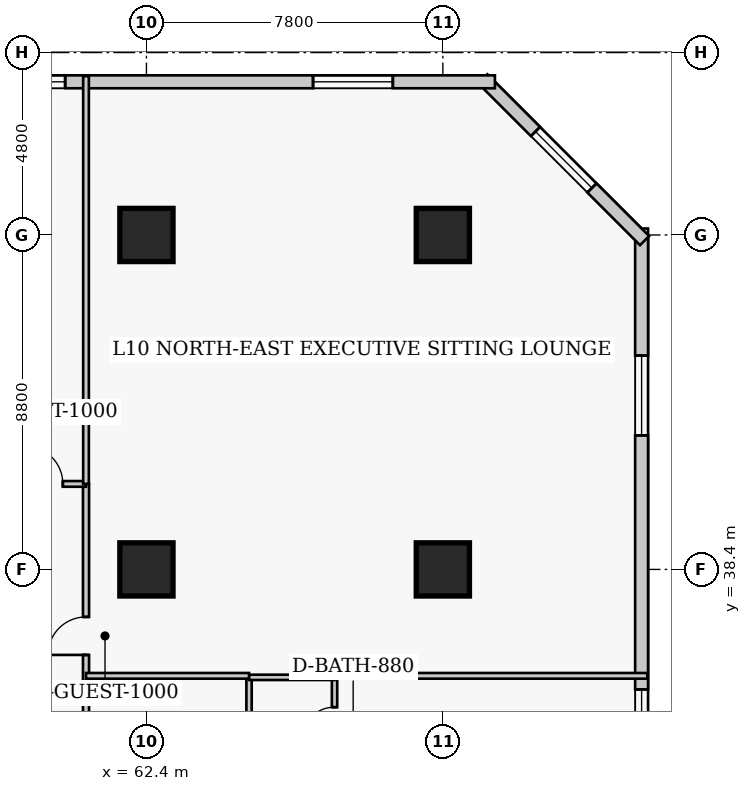
"""IFC4 building model, lengths in metres.
Left out: names, types, materials, properties, quantities, classifications, styles, units other than length and angle.
Written with IfcOpenShell. Run it as: python <this file> out.ifc"""

import sys

from ifc_helpers import new_model, si_unit, direction, frame, frame_2d, origin, origin_2d, place, context, subcontext, project, spatial, rectangle, extrude, element, fill, save


model = new_model("IFC4")
c1 = context("Model", 3, precision=1e-05, world=origin(), true_north=direction((0.0, 1.0)))
c2 = subcontext(c1, "Body", "Model", "MODEL_VIEW")
j1 = project(units=[si_unit("LENGTHUNIT", "METRE"), si_unit("PLANEANGLEUNIT", "RADIAN")], contexts=[c1])
p1 = place(None, origin())
s1 = spatial("IfcSite", under=j1, at=p1, CompositionType="ELEMENT")
p2 = place(p1, origin())
s2 = spatial("IfcBuilding", under=s1, at=p2, CompositionType="ELEMENT")
p3 = place(p2, frame((0.0, 0.0, 45.0)))
s3 = spatial("IfcBuildingStorey", under=s2, at=p3, CompositionType="ELEMENT", Elevation=45.0)
for number, where, z_axis, x_axis in (
    (1, (62.4, 38.4, 0.0), (0.0, 0.0, 1.0), (1.0, 0.0, 0.0)),
    (2, (62.4, 47.2, 0.0), (0.0, 0.0, 1.0), (1.0, 0.0, 0.0)),
    (3, (70.2, 38.4, 0.0), (0.0, 0.0, 1.0), (1.0, 0.0, 0.0)),
    (4, (70.2, 47.2, 0.0), (0.0, 0.0, 1.0), (1.0, 0.0, 0.0)),
):
    element("IfcColumn", number, at=place(p3, frame(where, z_axis=z_axis, x_axis=x_axis)), inside=s3, PredefinedType="COLUMN", context=c2, shape_type="SweptSolid", body=[
        extrude(rectangle(XDim=1.4, YDim=1.4, at=origin_2d()), origin(), (0.0, 0.0, 1.0), 3.8),
    ])
p4 = place(p3, frame((75.43, 12.23, 0.0), z_axis=(0.0, 0.0, 1.0), x_axis=(0.0, 1.0, 0.0)))
e5 = element("IfcWall", 5, at=p4, inside=s3, PredefinedType="SOLIDWALL", context=c2, shape_type="SweptSolid", body=[
    extrude(rectangle(XDim=35.14, YDim=0.34, at=frame_2d((17.57, 0.0))), origin(), (0.0, 0.0, 1.0), 3.54),
])
p5 = place(p4, frame((3.343, 0.0, 0.85)))
e6 = element("IfcOpeningElement", 6, at=p5, cuts=e5, PredefinedType="OPENING", context=c2, shape_type="SweptSolid", body=[
    extrude(rectangle(XDim=2.1, YDim=1.85, at=frame_2d((1.05, 0.925))), frame((0.0, 0.18, 0.0), z_axis=(0.0, -1.0, 0.0), x_axis=(1.0, 0.0, 0.0)), (0.0, 0.0, 1.0), 0.36),
])
p6 = place(p4, frame((12.127, 0.0, 0.85)))
e7 = element("IfcOpeningElement", 7, at=p6, cuts=e5, PredefinedType="OPENING", context=c2, shape_type="SweptSolid", body=[
    extrude(rectangle(XDim=2.1, YDim=1.85, at=frame_2d((1.05, 0.925))), frame((0.0, 0.18, 0.0), z_axis=(0.0, -1.0, 0.0), x_axis=(1.0, 0.0, 0.0)), (0.0, 0.0, 1.0), 0.36),
])
p7 = place(p4, frame((20.913, 0.0, 0.85)))
e8 = element("IfcOpeningElement", 8, at=p7, cuts=e5, PredefinedType="OPENING", context=c2, shape_type="SweptSolid", body=[
    extrude(rectangle(XDim=2.1, YDim=1.85, at=frame_2d((1.05, 0.925))), frame((0.0, 0.18, 0.0), z_axis=(0.0, -1.0, 0.0), x_axis=(1.0, 0.0, 0.0)), (0.0, 0.0, 1.0), 0.36),
])
p8 = place(p4, frame((29.698, 0.0, 0.85)))
e9 = element("IfcOpeningElement", 9, at=p8, cuts=e5, PredefinedType="OPENING", context=c2, shape_type="SweptSolid", body=[
    extrude(rectangle(XDim=2.1, YDim=1.85, at=frame_2d((1.05, 0.925))), frame((0.0, 0.18, 0.0), z_axis=(0.0, -1.0, 0.0), x_axis=(1.0, 0.0, 0.0)), (0.0, 0.0, 1.0), 0.36),
])
p9 = place(p3, frame((75.508, 47.052, 0.0), z_axis=(0.0, 0.0, 1.0), x_axis=(-0.707106781187, 0.707106781187, 0.0)))
e10 = element("IfcWall", 10, at=p9, inside=s3, PredefinedType="SOLIDWALL", context=c2, shape_type="SweptSolid", body=[
    extrude(rectangle(XDim=6.02, YDim=0.34, at=frame_2d((3.01, 0.0))), origin(), (0.0, 0.0, 1.0), 3.54),
])
p10 = place(p9, frame((1.96, 0.0, 0.85)))
e11 = element("IfcOpeningElement", 11, at=p10, cuts=e10, PredefinedType="OPENING", context=c2, shape_type="SweptSolid", body=[
    extrude(rectangle(XDim=2.1, YDim=1.85, at=frame_2d((1.05, 0.925))), frame((0.0, 0.18, 0.0), z_axis=(0.0, -1.0, 0.0), x_axis=(1.0, 0.0, 0.0)), (0.0, 0.0, 1.0), 0.36),
])
p11 = place(p3, frame((71.57, 51.23, 0.0), z_axis=(0.0, 0.0, 1.0), x_axis=(-1.0, 0.0, 0.0)))
e12 = element("IfcWall", 12, at=p11, inside=s3, PredefinedType="SOLIDWALL", context=c2, shape_type="SweptSolid", body=[
    extrude(rectangle(XDim=29.89, YDim=0.34, at=frame_2d((14.945, 0.0))), origin(), (0.0, 0.0, 1.0), 3.54),
])
p12 = place(p11, frame((2.686, 0.0, 0.85)))
e13 = element("IfcOpeningElement", 13, at=p12, cuts=e12, PredefinedType="OPENING", context=c2, shape_type="SweptSolid", body=[
    extrude(rectangle(XDim=2.1, YDim=1.85, at=frame_2d((1.05, 0.925))), frame((0.0, 0.18, 0.0), z_axis=(0.0, -1.0, 0.0), x_axis=(1.0, 0.0, 0.0)), (0.0, 0.0, 1.0), 0.36),
])
p13 = place(p11, frame((11.309, 0.0, 0.85)))
e14 = element("IfcOpeningElement", 14, at=p13, cuts=e12, PredefinedType="OPENING", context=c2, shape_type="SweptSolid", body=[
    extrude(rectangle(XDim=2.1, YDim=1.85, at=frame_2d((1.05, 0.925))), frame((0.0, 0.18, 0.0), z_axis=(0.0, -1.0, 0.0), x_axis=(1.0, 0.0, 0.0)), (0.0, 0.0, 1.0), 0.36),
])
p14 = place(p11, frame((17.631, 0.0, 0.85)))
e15 = element("IfcOpeningElement", 15, at=p14, cuts=e12, PredefinedType="OPENING", context=c2, shape_type="SweptSolid", body=[
    extrude(rectangle(XDim=2.1, YDim=1.85, at=frame_2d((1.05, 0.925))), frame((0.0, 0.18, 0.0), z_axis=(0.0, -1.0, 0.0), x_axis=(1.0, 0.0, 0.0)), (0.0, 0.0, 1.0), 0.36),
])
p15 = place(p11, frame((25.104, 0.0, 0.85)))
e16 = element("IfcOpeningElement", 16, at=p15, cuts=e12, PredefinedType="OPENING", context=c2, shape_type="SweptSolid", body=[
    extrude(rectangle(XDim=2.1, YDim=1.85, at=frame_2d((1.05, 0.925))), frame((0.0, 0.18, 0.0), z_axis=(0.0, -1.0, 0.0), x_axis=(1.0, 0.0, 0.0)), (0.0, 0.0, 1.0), 0.36),
])
p16 = place(p3, frame((60.81, 10.25, 0.0), z_axis=(0.0, 0.0, 1.0), x_axis=(0.0, 1.0, 0.0)))
e17 = element("IfcWall", 17, at=p16, inside=s3, PredefinedType="PARTITIONING", context=c2, shape_type="SweptSolid", body=[
    extrude(rectangle(XDim=30.4, YDim=0.16, at=frame_2d((15.2, 0.0))), origin(), (0.0, 0.0, 1.0), 3.54),
])
p17 = place(p16, frame((4.4, 0.0, 0.0)))
e18 = element("IfcOpeningElement", 18, at=p17, cuts=e17, PredefinedType="OPENING", context=c2, shape_type="SweptSolid", body=[
    extrude(rectangle(XDim=0.95, YDim=2.1, at=frame_2d((0.475, 1.05))), frame((0.0, 0.09, 0.0), z_axis=(0.0, -1.0, 0.0), x_axis=(1.0, 0.0, 0.0)), (0.0, 0.0, 1.0), 0.18),
])
p18 = place(p16, frame((13.175, 0.0, 0.0)))
e19 = element("IfcOpeningElement", 19, at=p18, cuts=e17, PredefinedType="OPENING", context=c2, shape_type="SweptSolid", body=[
    extrude(rectangle(XDim=0.95, YDim=2.1, at=frame_2d((0.475, 1.05))), frame((0.0, 0.09, 0.0), z_axis=(0.0, -1.0, 0.0), x_axis=(1.0, 0.0, 0.0)), (0.0, 0.0, 1.0), 0.18),
])
p19 = place(p16, frame((20.975, 0.0, 0.0)))
e20 = element("IfcOpeningElement", 20, at=p19, cuts=e17, PredefinedType="OPENING", context=c2, shape_type="SweptSolid", body=[
    extrude(rectangle(XDim=0.95, YDim=2.1, at=frame_2d((0.475, 1.05))), frame((0.0, 0.09, 0.0), z_axis=(0.0, -1.0, 0.0), x_axis=(1.0, 0.0, 0.0)), (0.0, 0.0, 1.0), 0.18),
])
p20 = place(p16, frame((25.9, 0.0, 0.0)))
e21 = element("IfcOpeningElement", 21, at=p20, cuts=e17, PredefinedType="OPENING", context=c2, shape_type="SweptSolid", body=[
    extrude(rectangle(XDim=1.0, YDim=2.15, at=frame_2d((0.5, 1.075))), frame((0.0, 0.09, 0.0), z_axis=(0.0, -1.0, 0.0), x_axis=(1.0, 0.0, 0.0)), (0.0, 0.0, 1.0), 0.18),
])
p21 = place(p3, frame((56.8, 40.65, 0.0), z_axis=(0.0, 0.0, 1.0), x_axis=(1.0, 0.0, 0.0)))
e22 = element("IfcWall", 22, at=p21, inside=s3, PredefinedType="PARTITIONING", context=c2, shape_type="SweptSolid", body=[
    extrude(rectangle(XDim=4.01, YDim=0.15, at=frame_2d((2.005, 0.0))), origin(), (0.0, 0.0, 1.0), 3.54),
])
p22 = place(p21, frame((2.4, 0.0, 0.0)))
e23 = element("IfcOpeningElement", 23, at=p22, cuts=e22, PredefinedType="OPENING", context=c2, shape_type="SweptSolid", body=[
    extrude(rectangle(XDim=1.0, YDim=2.15, at=frame_2d((0.5, 1.075))), frame((0.0, 0.085, 0.0), z_axis=(0.0, -1.0, 0.0), x_axis=(1.0, 0.0, 0.0)), (0.0, 0.0, 1.0), 0.17),
])
p23 = place(p3, frame((60.81, 40.65, 0.0), z_axis=(0.0, 0.0, 1.0), x_axis=(0.0, 1.0, 0.0)))
e24 = element("IfcWall", 24, at=p23, inside=s3, PredefinedType="PARTITIONING", context=c2, shape_type="SweptSolid", body=[
    extrude(rectangle(XDim=10.73, YDim=0.15, at=frame_2d((5.365, 0.0))), origin(), (0.0, 0.0, 1.0), 3.54),
])
p24 = place(p3, frame((65.1, 33.11, 0.0), z_axis=(0.0, 0.0, 1.0), x_axis=(0.0, 1.0, 0.0)))
e25 = element("IfcWall", 25, at=p24, inside=s3, PredefinedType="PLUMBINGWALL", context=c2, shape_type="SweptSolid", body=[
    extrude(rectangle(XDim=2.45, YDim=0.14, at=frame_2d((1.225, 0.0))), origin(), (0.0, 0.0, 1.0), 3.54),
])
p25 = place(p3, frame((67.35, 33.11, 0.0), z_axis=(0.0, 0.0, 1.0), x_axis=(0.0, 1.0, 0.0)))
e26 = element("IfcWall", 26, at=p25, inside=s3, PredefinedType="PLUMBINGWALL", context=c2, shape_type="SweptSolid", body=[
    extrude(rectangle(XDim=2.45, YDim=0.14, at=frame_2d((1.225, 0.0))), origin(), (0.0, 0.0, 1.0), 3.54),
])
p26 = place(p25, frame((0.785, 0.0, 0.0)))
e27 = element("IfcOpeningElement", 27, at=p26, cuts=e26, PredefinedType="OPENING", context=c2, shape_type="SweptSolid", body=[
    extrude(rectangle(XDim=0.88, YDim=2.05, at=frame_2d((0.44, 1.025))), frame((0.0, 0.08, 0.0), z_axis=(0.0, -1.0, 0.0), x_axis=(1.0, 0.0, 0.0)), (0.0, 0.0, 1.0), 0.16),
])
p27 = place(p3, frame((65.1, 35.56, 0.0), z_axis=(0.0, 0.0, 1.0), x_axis=(1.0, 0.0, 0.0)))
e28 = element("IfcWall", 28, at=p27, inside=s3, PredefinedType="PLUMBINGWALL", context=c2, shape_type="SweptSolid", body=[
    extrude(rectangle(XDim=2.25, YDim=0.14, at=frame_2d((1.125, 0.0))), origin(), (0.0, 0.0, 1.0), 3.54),
])
p28 = place(p3, frame((60.81, 35.6, 0.0), z_axis=(0.0, 0.0, 1.0), x_axis=(1.0, 0.0, 0.0)))
e29 = element("IfcWall", 29, at=p28, inside=s3, PredefinedType="PARTITIONING", context=c2, shape_type="SweptSolid", body=[
    extrude(rectangle(XDim=4.29, YDim=0.15, at=frame_2d((2.145, 0.0))), origin(), (0.0, 0.0, 1.0), 3.54),
])
p29 = place(p3, frame((67.35, 35.6, 0.0), z_axis=(0.0, 0.0, 1.0), x_axis=(1.0, 0.0, 0.0)))
e30 = element("IfcWall", 30, at=p29, inside=s3, PredefinedType="PARTITIONING", context=c2, shape_type="SweptSolid", body=[
    extrude(rectangle(XDim=8.23, YDim=0.15, at=frame_2d((4.115, 0.0))), origin(), (0.0, 0.0, 1.0), 3.54),
])
p30 = place(p7, origin())
e31 = element("IfcWindow", 31, at=p30, inside=s3, PartitioningType="SINGLE_PANEL", PredefinedType="WINDOW", context=c2, shape_type="SweptSolid", body=[
    extrude(rectangle(XDim=2.1, YDim=1.85, at=frame_2d((1.05, 0.925))), frame((0.0, 0.03, 0.0), z_axis=(0.0, -1.0, 0.0), x_axis=(1.0, 0.0, 0.0)), (0.0, 0.0, 1.0), 0.06),
])
fill(e8, e31)
p31 = place(p8, origin())
e32 = element("IfcWindow", 32, at=p31, inside=s3, PartitioningType="SINGLE_PANEL", PredefinedType="WINDOW", context=c2, shape_type="SweptSolid", body=[
    extrude(rectangle(XDim=2.1, YDim=1.85, at=frame_2d((1.05, 0.925))), frame((0.0, 0.03, 0.0), z_axis=(0.0, -1.0, 0.0), x_axis=(1.0, 0.0, 0.0)), (0.0, 0.0, 1.0), 0.06),
])
fill(e9, e32)
p32 = place(p10, origin())
e33 = element("IfcWindow", 33, at=p32, inside=s3, PartitioningType="SINGLE_PANEL", PredefinedType="WINDOW", context=c2, shape_type="SweptSolid", body=[
    extrude(rectangle(XDim=2.1, YDim=1.85, at=frame_2d((1.05, 0.925))), frame((0.0, 0.03, 0.0), z_axis=(0.0, -1.0, 0.0), x_axis=(1.0, 0.0, 0.0)), (0.0, 0.0, 1.0), 0.06),
])
fill(e11, e33)
p33 = place(p12, origin())
e34 = element("IfcWindow", 34, at=p33, inside=s3, PartitioningType="SINGLE_PANEL", PredefinedType="WINDOW", context=c2, shape_type="SweptSolid", body=[
    extrude(rectangle(XDim=2.1, YDim=1.85, at=frame_2d((1.05, 0.925))), frame((0.0, 0.03, 0.0), z_axis=(0.0, -1.0, 0.0), x_axis=(1.0, 0.0, 0.0)), (0.0, 0.0, 1.0), 0.06),
])
fill(e13, e34)
p34 = place(p13, origin())
e35 = element("IfcWindow", 35, at=p34, inside=s3, PartitioningType="SINGLE_PANEL", PredefinedType="WINDOW", context=c2, shape_type="SweptSolid", body=[
    extrude(rectangle(XDim=2.1, YDim=1.85, at=frame_2d((1.05, 0.925))), frame((0.0, 0.03, 0.0), z_axis=(0.0, -1.0, 0.0), x_axis=(1.0, 0.0, 0.0)), (0.0, 0.0, 1.0), 0.06),
])
fill(e14, e35)
p35 = place(p22, origin())
e36 = element("IfcDoor", 36, at=p35, inside=s3, OperationType="SINGLE_SWING_LEFT", PredefinedType="DOOR", context=c2, shape_type="SweptSolid", body=[
    extrude(rectangle(XDim=1.0, YDim=2.15, at=frame_2d((0.5, 1.075))), frame((0.0, 0.025, 0.0), z_axis=(0.0, -1.0, 0.0), x_axis=(1.0, 0.0, 0.0)), (0.0, 0.0, 1.0), 0.05),
])
fill(e23, e36)
p36 = place(p26, origin())
e37 = element("IfcDoor", 37, at=p36, inside=s3, OperationType="SINGLE_SWING_LEFT", PredefinedType="DOOR", context=c2, shape_type="SweptSolid", body=[
    extrude(rectangle(XDim=0.88, YDim=2.05, at=frame_2d((0.44, 1.025))), frame((0.0, 0.025, 0.0), z_axis=(0.0, -1.0, 0.0), x_axis=(1.0, 0.0, 0.0)), (0.0, 0.0, 1.0), 0.05),
])
fill(e27, e37)
p37 = place(p20, origin())
e38 = element("IfcDoor", 38, at=p37, inside=s3, OperationType="SINGLE_SWING_LEFT", PredefinedType="DOOR", context=c2, shape_type="SweptSolid", body=[
    extrude(rectangle(XDim=1.0, YDim=2.15, at=frame_2d((0.5, 1.075))), frame((0.0, 0.025, 0.0), z_axis=(0.0, -1.0, 0.0), x_axis=(1.0, 0.0, 0.0)), (0.0, 0.0, 1.0), 0.05),
])
fill(e21, e38)
save(model, sys.argv[1])
